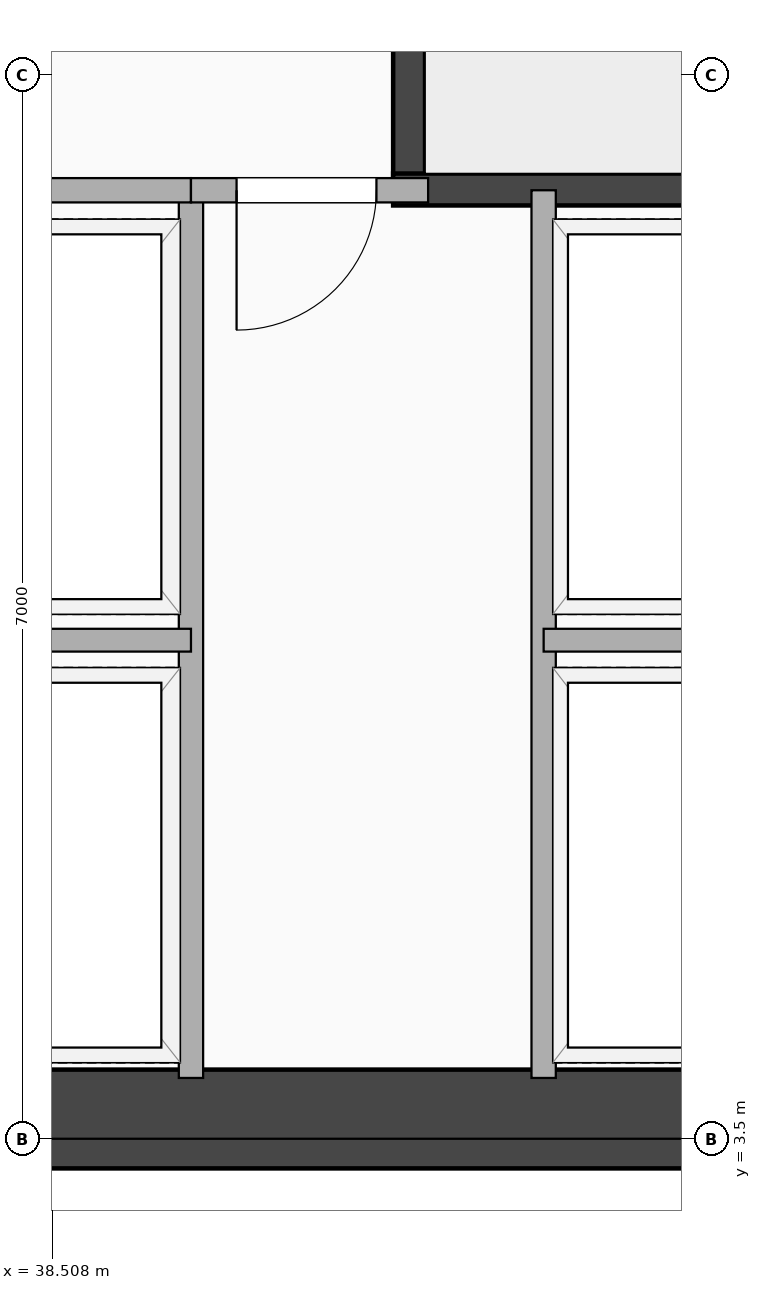
"""IFC4 building model, lengths in metres.
Left out: names, types, materials, properties, quantities, classifications, styles, units other than length and angle.
Written with IfcOpenShell. Run it as: python <this file> out.ifc"""

import sys

from ifc_helpers import new_model, si_unit, direction, frame, frame_2d, origin, place, context, subcontext, project, spatial, rectangle, extrude, element, fill, save


model = new_model("IFC4")
c1 = context("Model", 3, precision=1e-05, world=origin(), true_north=direction((0.0, 1.0)))
c2 = subcontext(c1, "Body", "Model", "MODEL_VIEW")
j1 = project(units=[si_unit("LENGTHUNIT", "METRE"), si_unit("PLANEANGLEUNIT", "RADIAN")], contexts=[c1])
p1 = place(None, origin())
s1 = spatial("IfcSite", under=j1, at=p1, CompositionType="ELEMENT")
p2 = place(p1, origin())
s2 = spatial("IfcBuilding", under=s1, at=p2, CompositionType="ELEMENT")
p3 = place(p2, frame((0.0, 0.0, 75.4)))
s3 = spatial("IfcBuildingStorey", under=s2, at=p3, CompositionType="ELEMENT", Elevation=75.4)
p4 = place(p3, frame((20.3, 3.63, 0.0), z_axis=(0.0, 0.0, 1.0), x_axis=(1.0, 0.0, 0.0)))
e1 = element("IfcWall", 1, at=p4, inside=s3, PredefinedType="SHEAR", context=c2, shape_type="SweptSolid", body=[
    extrude(rectangle(XDim=24.5, YDim=0.65, at=frame_2d((12.25, 0.0))), origin(), (0.0, 0.0, 1.0), 8.14),
])
p5 = place(p3, frame((40.855, 9.745, 0.0), z_axis=(0.0, 0.0, 1.0), x_axis=(0.0, 1.0, 0.0)))
e2 = element("IfcWall", 2, at=p5, inside=s3, PredefinedType="SHEAR", context=c2, shape_type="SweptSolid", body=[
    extrude(rectangle(XDim=8.01, YDim=0.21, at=frame_2d((4.005, 0.0))), origin(), (0.0, 0.0, 1.0), 8.14),
])
p6 = place(p3, frame((40.75, 9.745, 0.0), z_axis=(0.0, 0.0, 1.0), x_axis=(1.0, 0.0, 0.0)))
e3 = element("IfcWall", 3, at=p6, inside=s3, PredefinedType="SHEAR", context=c2, shape_type="SweptSolid", body=[
    extrude(rectangle(XDim=3.66, YDim=0.21, at=frame_2d((1.83, 0.0))), origin(), (0.0, 0.0, 1.0), 8.14),
])
for number, where, z_axis, x_axis in (
    (4, (39.42, 3.9, 0.0), (0.0, 0.0, 1.0), (0.0, 1.0, 0.0)),
    (5, (41.74, 3.9, 0.0), (0.0, 0.0, 1.0), (0.0, 1.0, 0.0)),
):
    element("IfcWall", number, at=place(p3, frame(where, z_axis=z_axis, x_axis=x_axis)), inside=s3, PredefinedType="PARTITIONING", context=c2, shape_type="SweptSolid", body=[
        extrude(rectangle(XDim=5.84, YDim=0.16, at=frame_2d((2.92, 0.0))), origin(), (0.0, 0.0, 1.0), 8.14),
    ])
p7 = place(p3, frame((37.25, 6.78, 0.0), z_axis=(0.0, 0.0, 1.0), x_axis=(1.0, 0.0, 0.0)))
e6 = element("IfcWall", 6, at=p7, inside=s3, PredefinedType="PARTITIONING", context=c2, shape_type="SweptSolid", body=[
    extrude(rectangle(XDim=2.17, YDim=0.15, at=frame_2d((1.085, 0.0))), origin(), (0.0, 0.0, 1.0), 8.14),
])
p8 = place(p3, frame((41.74, 6.78, 0.0), z_axis=(0.0, 0.0, 1.0), x_axis=(1.0, 0.0, 0.0)))
e7 = element("IfcWall", 7, at=p8, inside=s3, PredefinedType="PARTITIONING", context=c2, shape_type="SweptSolid", body=[
    extrude(rectangle(XDim=2.66, YDim=0.15, at=frame_2d((1.33, 0.0))), origin(), (0.0, 0.0, 1.0), 6.445),
])
p9 = place(p3, frame((37.25, 9.74, 0.0), z_axis=(0.0, 0.0, 1.0), x_axis=(1.0, 0.0, 0.0)))
e8 = element("IfcWall", 8, at=p9, inside=s3, PredefinedType="PARTITIONING", context=c2, shape_type="SweptSolid", body=[
    extrude(rectangle(XDim=2.17, YDim=0.16, at=frame_2d((1.085, 0.0))), origin(), (0.0, 0.0, 1.0), 8.14),
])
p10 = place(p3, frame((39.42, 9.74, 0.0), z_axis=(0.0, 0.0, 1.0), x_axis=(1.0, 0.0, 0.0)))
e9 = element("IfcWall", 9, at=p10, inside=s3, PredefinedType="PARTITIONING", context=c2, shape_type="SweptSolid", body=[
    extrude(rectangle(XDim=1.56, YDim=0.16, at=frame_2d((0.78, 0.0))), origin(), (0.0, 0.0, 1.0), 8.14),
])
p11 = place(p10, frame((0.3, 0.0, 0.0)))
e10 = element("IfcOpeningElement", 10, at=p11, cuts=e9, PredefinedType="OPENING", context=c2, shape_type="SweptSolid", body=[
    extrude(rectangle(XDim=0.92, YDim=2.08, at=frame_2d((0.46, 1.04))), frame((0.0, 0.09, 0.0), z_axis=(0.0, -1.0, 0.0), x_axis=(1.0, 0.0, 0.0)), (0.0, 0.0, 1.0), 0.18),
])
p12 = place(p11, origin())
e11 = element("IfcDoor", 11, at=p12, inside=s3, OperationType="SINGLE_SWING_LEFT", PredefinedType="DOOR", context=c2, shape_type="SweptSolid", body=[
    extrude(rectangle(XDim=0.92, YDim=2.08, at=frame_2d((0.46, 1.04))), frame((0.0, 0.025, 0.0), z_axis=(0.0, -1.0, 0.0), x_axis=(1.0, 0.0, 0.0)), (0.0, 0.0, 1.0), 0.05),
])
fill(e10, e11)
save(model, sys.argv[1])
